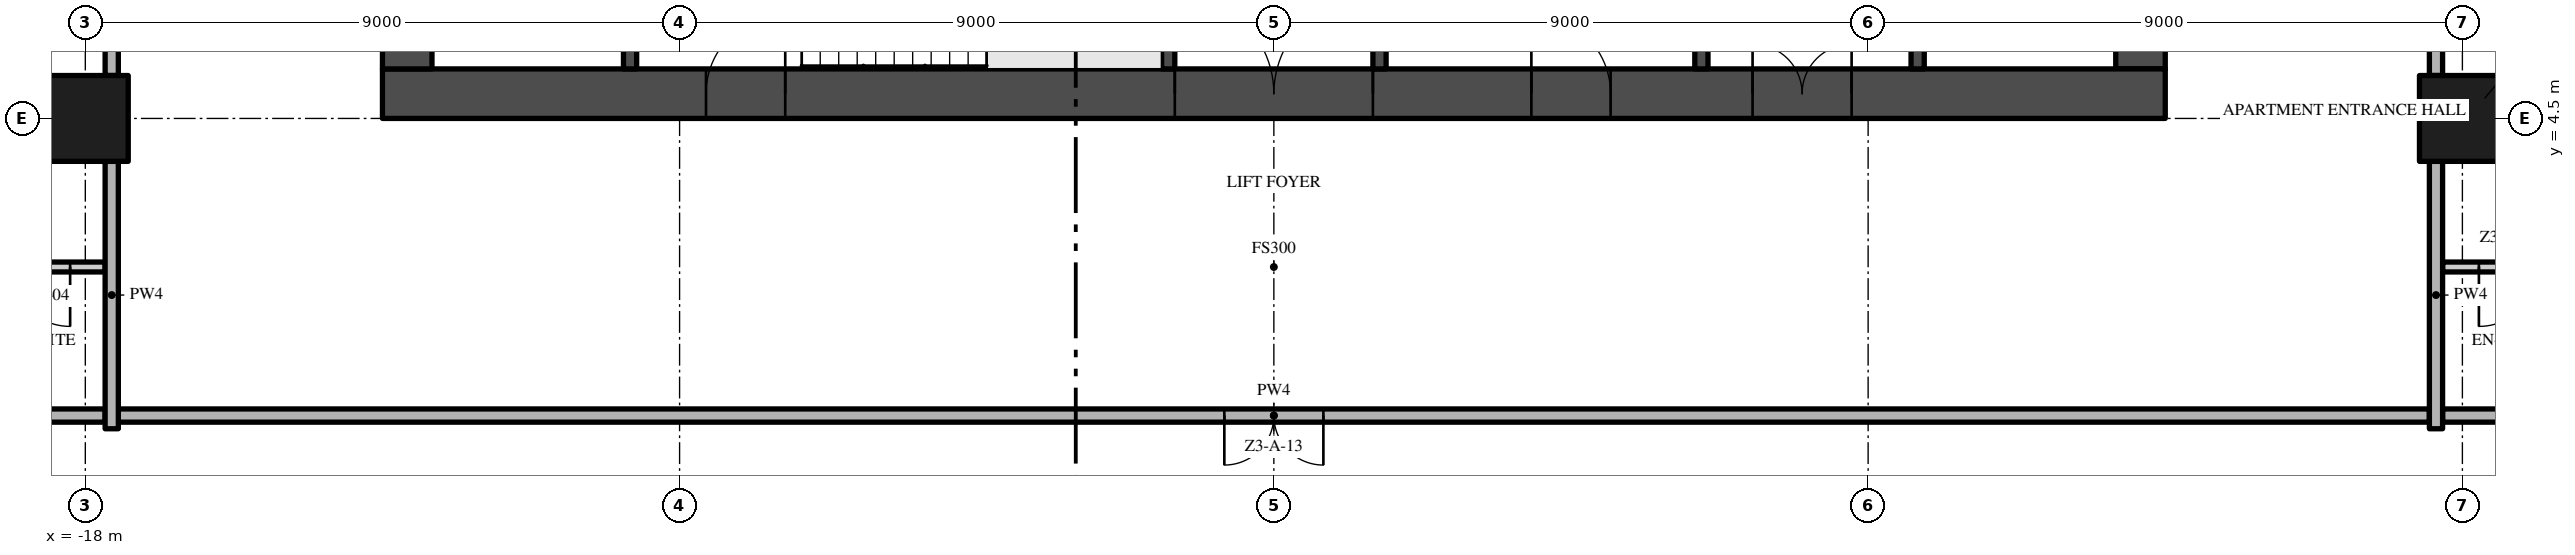
"""IFC4 building model, lengths in metres.
Left out: names, types, materials, properties, quantities, classifications, styles, units other than length and angle.
Written with IfcOpenShell. Run it as: python <this file> out.ifc"""

import sys

from ifc_helpers import new_model, si_unit, direction, frame, frame_2d, origin, origin_2d, place, context, subcontext, project, spatial, rectangle, extrude, element, fill, save


model = new_model("IFC4")
c1 = context("Model", 3, precision=1e-05, world=origin(), true_north=direction((0.0, 1.0)))
c2 = subcontext(c1, "Body", "Model", "MODEL_VIEW")
j1 = project(units=[si_unit("LENGTHUNIT", "METRE"), si_unit("PLANEANGLEUNIT", "RADIAN")], contexts=[c1])
p1 = place(None, origin())
s1 = spatial("IfcSite", under=j1, at=p1, CompositionType="ELEMENT")
p2 = place(p1, origin())
s2 = spatial("IfcBuilding", under=s1, at=p2, CompositionType="ELEMENT")
p3 = place(p2, frame((0.0, 0.0, 128.8)))
s3 = spatial("IfcBuildingStorey", under=s2, at=p3, CompositionType="ELEMENT", Elevation=128.8)
p4 = place(p3, frame((-13.5, 4.875, -0.3), z_axis=(0.0, 0.0, 1.0), x_axis=(1.0, 0.0, 0.0)))
e1 = element("IfcWall", 1, at=p4, inside=s3, PredefinedType="SHEAR", context=c2, shape_type="SweptSolid", body=[
    extrude(rectangle(XDim=27.0, YDim=0.75, at=frame_2d((13.5, 0.0))), origin(), (0.0, 0.0, 1.0), 3.8),
])
p5 = place(p4, frame((12.0, 0.0, 0.3)))
e2 = element("IfcOpeningElement", 2, at=p5, cuts=e1, PredefinedType="OPENING", context=c2, shape_type="SweptSolid", body=[
    extrude(rectangle(XDim=3.0, YDim=2.4, at=frame_2d((1.5, 1.2))), frame((0.0, 0.385, 0.0), z_axis=(0.0, -1.0, 0.0), x_axis=(1.0, 0.0, 0.0)), (0.0, 0.0, 1.0), 0.77),
])
p6 = place(p4, frame((4.9, 0.0, 0.3)))
e3 = element("IfcOpeningElement", 3, at=p6, cuts=e1, PredefinedType="OPENING", context=c2, shape_type="SweptSolid", body=[
    extrude(rectangle(XDim=1.2, YDim=2.2, at=frame_2d((0.6, 1.1))), frame((0.0, 0.385, 0.0), z_axis=(0.0, -1.0, 0.0), x_axis=(1.0, 0.0, 0.0)), (0.0, 0.0, 1.0), 0.77),
])
p7 = place(p4, frame((20.75, 0.0, 0.3)))
e4 = element("IfcOpeningElement", 4, at=p7, cuts=e1, PredefinedType="OPENING", context=c2, shape_type="SweptSolid", body=[
    extrude(rectangle(XDim=1.5, YDim=2.2, at=frame_2d((0.75, 1.1))), frame((0.0, 0.385, 0.0), z_axis=(0.0, -1.0, 0.0), x_axis=(1.0, 0.0, 0.0)), (0.0, 0.0, 1.0), 0.77),
])
p8 = place(p4, frame((17.4, 0.0, 0.3)))
e5 = element("IfcOpeningElement", 5, at=p8, cuts=e1, PredefinedType="OPENING", context=c2, shape_type="SweptSolid", body=[
    extrude(rectangle(XDim=1.2, YDim=2.2, at=frame_2d((0.6, 1.1))), frame((0.0, 0.385, 0.0), z_axis=(0.0, -1.0, 0.0), x_axis=(1.0, 0.0, 0.0)), (0.0, 0.0, 1.0), 0.77),
])
p9 = place(p3, frame((13.125, 5.25, -0.3), z_axis=(0.0, 0.0, 1.0), x_axis=(0.0, 1.0, 0.0)))
e6 = element("IfcWall", 6, at=p9, inside=s3, PredefinedType="SHEAR", context=c2, shape_type="SweptSolid", body=[
    extrude(rectangle(XDim=16.5, YDim=0.75, at=frame_2d((8.25, 0.0))), origin(), (0.0, 0.0, 1.0), 3.8),
])
p10 = place(p9, frame((6.15, 0.0, 0.3)))
e7 = element("IfcOpeningElement", 7, at=p10, cuts=e6, PredefinedType="OPENING", context=c2, shape_type="SweptSolid", body=[
    extrude(rectangle(XDim=1.2, YDim=2.2, at=frame_2d((0.6, 1.1))), frame((0.0, 0.385, 0.0), z_axis=(0.0, -1.0, 0.0), x_axis=(1.0, 0.0, 0.0)), (0.0, 0.0, 1.0), 0.77),
])
p11 = place(p3, frame((-13.125, 21.75, -0.3), z_axis=(0.0, 0.0, 1.0), x_axis=(0.0, -1.0, 0.0)))
e8 = element("IfcWall", 8, at=p11, inside=s3, PredefinedType="SHEAR", context=c2, shape_type="SweptSolid", body=[
    extrude(rectangle(XDim=16.5, YDim=0.75, at=frame_2d((8.25, 0.0))), origin(), (0.0, 0.0, 1.0), 3.8),
])
p12 = place(p11, frame((9.15, 0.0, 0.3)))
e9 = element("IfcOpeningElement", 9, at=p12, cuts=e8, PredefinedType="OPENING", context=c2, shape_type="SweptSolid", body=[
    extrude(rectangle(XDim=1.2, YDim=2.2, at=frame_2d((0.6, 1.1))), frame((0.0, 0.385, 0.0), z_axis=(0.0, -1.0, 0.0), x_axis=(1.0, 0.0, 0.0)), (0.0, 0.0, 1.0), 0.77),
])
for number, where, z_axis, x_axis in (
    (10, (-18.0, 4.5, 0.0), (0.0, 0.0, 1.0), (1.0, 0.0, 0.0)),
    (11, (18.0, 4.5, 0.0), (0.0, 0.0, 1.0), (1.0, 0.0, 0.0)),
):
    element("IfcColumn", number, at=place(p3, frame(where, z_axis=z_axis, x_axis=x_axis)), inside=s3, PredefinedType="COLUMN", context=c2, shape_type="SweptSolid", body=[
        extrude(rectangle(XDim=1.3, YDim=1.3, at=origin_2d()), origin(), (0.0, 0.0, 1.0), 3.5),
    ])
for number, where, z_axis, x_axis in (
    (12, (-9.75, 5.25, 0.0), (0.0, 0.0, 1.0), (0.0, 1.0, 0.0)),
    (13, (-1.6, 5.25, 0.0), (0.0, 0.0, 1.0), (0.0, 1.0, 0.0)),
):
    element("IfcWall", number, at=place(p3, frame(where, z_axis=z_axis, x_axis=x_axis)), inside=s3, PredefinedType="SHEAR", context=c2, shape_type="SweptSolid", body=[
        extrude(rectangle(XDim=2.7, YDim=0.2, at=frame_2d((1.35, 0.0))), origin(), (0.0, 0.0, 1.0), 3.5),
    ])
p13 = place(p3, frame((1.6, 9.2, 0.0), z_axis=(0.0, 0.0, 1.0), x_axis=(0.0, -1.0, 0.0)))
e14 = element("IfcWall", 14, at=p13, inside=s3, PredefinedType="SHEAR", context=c2, shape_type="SweptSolid", body=[
    extrude(rectangle(XDim=3.95, YDim=0.2, at=frame_2d((1.975, 0.0))), origin(), (0.0, 0.0, 1.0), 3.5),
])
p14 = place(p13, frame((1.125, 0.0, 0.0)))
e15 = element("IfcOpeningElement", 15, at=p14, cuts=e14, PredefinedType="OPENING", context=c2, shape_type="SweptSolid", body=[
    extrude(rectangle(XDim=0.9, YDim=2.1, at=frame_2d((0.45, 1.05))), frame((0.0, 0.11, 0.0), z_axis=(0.0, -1.0, 0.0), x_axis=(1.0, 0.0, 0.0)), (0.0, 0.0, 1.0), 0.22),
])
p15 = place(p3, frame((6.475, 5.25, 0.0), z_axis=(0.0, 0.0, 1.0), x_axis=(0.0, 1.0, 0.0)))
e16 = element("IfcWall", 16, at=p15, inside=s3, PredefinedType="SHEAR", context=c2, shape_type="SweptSolid", body=[
    extrude(rectangle(XDim=3.95, YDim=0.2, at=frame_2d((1.975, 0.0))), origin(), (0.0, 0.0, 1.0), 3.5),
])
p16 = place(p3, frame((9.75, 5.25, 0.0), z_axis=(0.0, 0.0, 1.0), x_axis=(0.0, 1.0, 0.0)))
e17 = element("IfcWall", 17, at=p16, inside=s3, PredefinedType="SHEAR", context=c2, shape_type="SweptSolid", body=[
    extrude(rectangle(XDim=2.35, YDim=0.2, at=frame_2d((1.175, 0.0))), origin(), (0.0, 0.0, 1.0), 3.5),
])
p17 = place(p16, frame((0.7, 0.0, 0.0)))
e18 = element("IfcOpeningElement", 18, at=p17, cuts=e17, PredefinedType="OPENING", context=c2, shape_type="SweptSolid", body=[
    extrude(rectangle(XDim=1.1, YDim=2.1, at=frame_2d((0.55, 1.05))), frame((0.0, 0.11, 0.0), z_axis=(0.0, -1.0, 0.0), x_axis=(1.0, 0.0, 0.0)), (0.0, 0.0, 1.0), 0.22),
])
p18 = place(p3, frame((17.5, 0.0, 0.0), z_axis=(0.0, 0.0, 1.0), x_axis=(-1.0, 0.0, 0.0)))
e19 = element("IfcWall", 19, at=p18, inside=s3, PredefinedType="PARTITIONING", context=c2, shape_type="SweptSolid", body=[
    extrude(rectangle(XDim=35.0, YDim=0.2, at=frame_2d((17.5, 0.0))), origin(), (0.0, 0.0, 1.0), 3.5),
])
p19 = place(p18, frame((16.75, 0.0, 0.0)))
e20 = element("IfcOpeningElement", 20, at=p19, cuts=e19, PredefinedType="OPENING", context=c2, shape_type="SweptSolid", body=[
    extrude(rectangle(XDim=1.5, YDim=2.4, at=frame_2d((0.75, 1.2))), frame((0.0, 0.11, 0.0), z_axis=(0.0, -1.0, 0.0), x_axis=(1.0, 0.0, 0.0)), (0.0, 0.0, 1.0), 0.22),
])
for number, where, z_axis, x_axis in (
    (21, (-22.2, 0.0, 0.0), (0.0, 0.0, 1.0), (1.0, 0.0, 0.0)),
    (22, (17.7, 0.0, 0.0), (0.0, 0.0, 1.0), (1.0, 0.0, 0.0)),
):
    element("IfcWall", number, at=place(p3, frame(where, z_axis=z_axis, x_axis=x_axis)), inside=s3, PredefinedType="PARTITIONING", context=c2, shape_type="SweptSolid", body=[
        extrude(rectangle(XDim=4.5, YDim=0.2, at=frame_2d((2.25, 0.0))), origin(), (0.0, 0.0, 1.0), 3.5),
    ])
p20 = place(p3, frame((-17.7, 2.25, 0.0), z_axis=(0.0, 0.0, 1.0), x_axis=(-1.0, 0.0, 0.0)))
e23 = element("IfcWall", 23, at=p20, inside=s3, PredefinedType="PARTITIONING", context=c2, shape_type="SweptSolid", body=[
    extrude(rectangle(XDim=2.03, YDim=0.15, at=frame_2d((1.015, 0.0))), origin(), (0.0, 0.0, 1.0), 3.5),
])
p21 = place(p20, frame((0.53, 0.0, 0.0)))
e24 = element("IfcOpeningElement", 24, at=p21, cuts=e23, PredefinedType="OPENING", context=c2, shape_type="SweptSolid", body=[
    extrude(rectangle(XDim=0.9, YDim=2.1, at=frame_2d((0.45, 1.05))), frame((0.0, 0.085, 0.0), z_axis=(0.0, -1.0, 0.0), x_axis=(1.0, 0.0, 0.0)), (0.0, 0.0, 1.0), 0.17),
])
p22 = place(p3, frame((19.73, 2.25, 0.0), z_axis=(0.0, 0.0, 1.0), x_axis=(-1.0, 0.0, 0.0)))
e25 = element("IfcWall", 25, at=p22, inside=s3, PredefinedType="PARTITIONING", context=c2, shape_type="SweptSolid", body=[
    extrude(rectangle(XDim=2.03, YDim=0.15, at=frame_2d((1.015, 0.0))), origin(), (0.0, 0.0, 1.0), 3.5),
])
p23 = place(p22, frame((0.58, 0.0, 0.0)))
e26 = element("IfcOpeningElement", 26, at=p23, cuts=e25, PredefinedType="OPENING", context=c2, shape_type="SweptSolid", body=[
    extrude(rectangle(XDim=0.9, YDim=2.1, at=frame_2d((0.45, 1.05))), frame((0.0, 0.085, 0.0), z_axis=(0.0, -1.0, 0.0), x_axis=(1.0, 0.0, 0.0)), (0.0, 0.0, 1.0), 0.17),
])
p24 = place(p3, frame((-17.6, -0.2, 0.0), z_axis=(0.0, 0.0, 1.0), x_axis=(0.0, 1.0, 0.0)))
e27 = element("IfcWall", 27, at=p24, inside=s3, PredefinedType="PARTITIONING", context=c2, shape_type="SweptSolid", body=[
    extrude(rectangle(XDim=4.05, YDim=0.2, at=frame_2d((2.025, 0.0))), origin(), (0.0, 0.0, 1.0), 3.5),
])
p25 = place(p3, frame((-17.6, 5.15, 0.0), z_axis=(0.0, 0.0, 1.0), x_axis=(0.0, 1.0, 0.0)))
e28 = element("IfcWall", 28, at=p25, inside=s3, PredefinedType="PARTITIONING", context=c2, shape_type="SweptSolid", body=[
    extrude(rectangle(XDim=7.7, YDim=0.2, at=frame_2d((3.85, 0.0))), origin(), (0.0, 0.0, 1.0), 3.5),
])
p26 = place(p25, frame((1.0, 0.0, 0.0)))
e29 = element("IfcOpeningElement", 29, at=p26, cuts=e28, PredefinedType="OPENING", context=c2, shape_type="SweptSolid", body=[
    extrude(rectangle(XDim=1.2, YDim=2.4, at=frame_2d((0.6, 1.2))), frame((0.0, 0.11, 0.0), z_axis=(0.0, -1.0, 0.0), x_axis=(1.0, 0.0, 0.0)), (0.0, 0.0, 1.0), 0.22),
])
p27 = place(p3, frame((17.6, -0.2, 0.0), z_axis=(0.0, 0.0, 1.0), x_axis=(0.0, 1.0, 0.0)))
e30 = element("IfcWall", 30, at=p27, inside=s3, PredefinedType="PARTITIONING", context=c2, shape_type="SweptSolid", body=[
    extrude(rectangle(XDim=4.05, YDim=0.2, at=frame_2d((2.025, 0.0))), origin(), (0.0, 0.0, 1.0), 3.5),
])
p28 = place(p3, frame((17.6, 12.85, 0.0), z_axis=(0.0, 0.0, 1.0), x_axis=(0.0, -1.0, 0.0)))
e31 = element("IfcWall", 31, at=p28, inside=s3, PredefinedType="PARTITIONING", context=c2, shape_type="SweptSolid", body=[
    extrude(rectangle(XDim=7.7, YDim=0.2, at=frame_2d((3.85, 0.0))), origin(), (0.0, 0.0, 1.0), 3.5),
])
p29 = place(p28, frame((5.5, 0.0, 0.0)))
e32 = element("IfcOpeningElement", 32, at=p29, cuts=e31, PredefinedType="OPENING", context=c2, shape_type="SweptSolid", body=[
    extrude(rectangle(XDim=1.2, YDim=2.4, at=frame_2d((0.6, 1.2))), frame((0.0, 0.11, 0.0), z_axis=(0.0, -1.0, 0.0), x_axis=(1.0, 0.0, 0.0)), (0.0, 0.0, 1.0), 0.22),
])
p30 = place(p5, frame((3.0, 0.0, 0.0), z_axis=(0.0, 0.0, 1.0), x_axis=(-1.0, 0.0, 0.0)))
e33 = element("IfcDoor", 33, at=p30, inside=s3, OperationType="DOUBLE_DOOR_SINGLE_SWING", PredefinedType="DOOR", context=c2, shape_type="SweptSolid", body=[
    extrude(rectangle(XDim=3.0, YDim=2.4, at=frame_2d((1.5, 1.2))), frame((0.0, 0.025, 0.0), z_axis=(0.0, -1.0, 0.0), x_axis=(1.0, 0.0, 0.0)), (0.0, 0.0, 1.0), 0.05),
])
fill(e2, e33)
p31 = place(p6, frame((1.2, 0.0, 0.0), z_axis=(0.0, 0.0, 1.0), x_axis=(-1.0, 0.0, 0.0)))
e34 = element("IfcDoor", 34, at=p31, inside=s3, OperationType="SINGLE_SWING_LEFT", PredefinedType="DOOR", context=c2, shape_type="SweptSolid", body=[
    extrude(rectangle(XDim=1.2, YDim=2.2, at=frame_2d((0.6, 1.1))), frame((0.0, 0.025, 0.0), z_axis=(0.0, -1.0, 0.0), x_axis=(1.0, 0.0, 0.0)), (0.0, 0.0, 1.0), 0.05),
])
fill(e3, e34)
p32 = place(p7, frame((1.5, 0.0, 0.0), z_axis=(0.0, 0.0, 1.0), x_axis=(-1.0, 0.0, 0.0)))
e35 = element("IfcDoor", 35, at=p32, inside=s3, OperationType="DOUBLE_DOOR_SINGLE_SWING", PredefinedType="DOOR", context=c2, shape_type="SweptSolid", body=[
    extrude(rectangle(XDim=1.5, YDim=2.2, at=frame_2d((0.75, 1.1))), frame((0.0, 0.025, 0.0), z_axis=(0.0, -1.0, 0.0), x_axis=(1.0, 0.0, 0.0)), (0.0, 0.0, 1.0), 0.05),
])
fill(e4, e35)
p33 = place(p8, frame((1.2, 0.0, 0.0), z_axis=(0.0, 0.0, 1.0), x_axis=(-1.0, 0.0, 0.0)))
e36 = element("IfcDoor", 36, at=p33, inside=s3, OperationType="SINGLE_SWING_RIGHT", PredefinedType="DOOR", context=c2, shape_type="SweptSolid", body=[
    extrude(rectangle(XDim=1.2, YDim=2.2, at=frame_2d((0.6, 1.1))), frame((0.0, 0.025, 0.0), z_axis=(0.0, -1.0, 0.0), x_axis=(1.0, 0.0, 0.0)), (0.0, 0.0, 1.0), 0.05),
])
fill(e5, e36)
p34 = place(p21, origin())
e37 = element("IfcDoor", 37, at=p34, inside=s3, OperationType="SINGLE_SWING_LEFT", PredefinedType="DOOR", context=c2, shape_type="SweptSolid", body=[
    extrude(rectangle(XDim=0.9, YDim=2.1, at=frame_2d((0.45, 1.05))), frame((0.0, 0.025, 0.0), z_axis=(0.0, -1.0, 0.0), x_axis=(1.0, 0.0, 0.0)), (0.0, 0.0, 1.0), 0.05),
])
fill(e24, e37)
p35 = place(p23, origin())
e38 = element("IfcDoor", 38, at=p35, inside=s3, OperationType="SINGLE_SWING_RIGHT", PredefinedType="DOOR", context=c2, shape_type="SweptSolid", body=[
    extrude(rectangle(XDim=0.9, YDim=2.1, at=frame_2d((0.45, 1.05))), frame((0.0, 0.025, 0.0), z_axis=(0.0, -1.0, 0.0), x_axis=(1.0, 0.0, 0.0)), (0.0, 0.0, 1.0), 0.05),
])
fill(e26, e38)
p36 = place(p19, origin())
e39 = element("IfcDoor", 39, at=p36, inside=s3, OperationType="DOUBLE_DOOR_SINGLE_SWING", PredefinedType="DOOR", context=c2, shape_type="SweptSolid", body=[
    extrude(rectangle(XDim=1.5, YDim=2.4, at=frame_2d((0.75, 1.2))), frame((0.0, 0.025, 0.0), z_axis=(0.0, -1.0, 0.0), x_axis=(1.0, 0.0, 0.0)), (0.0, 0.0, 1.0), 0.05),
])
fill(e20, e39)
save(model, sys.argv[1])
